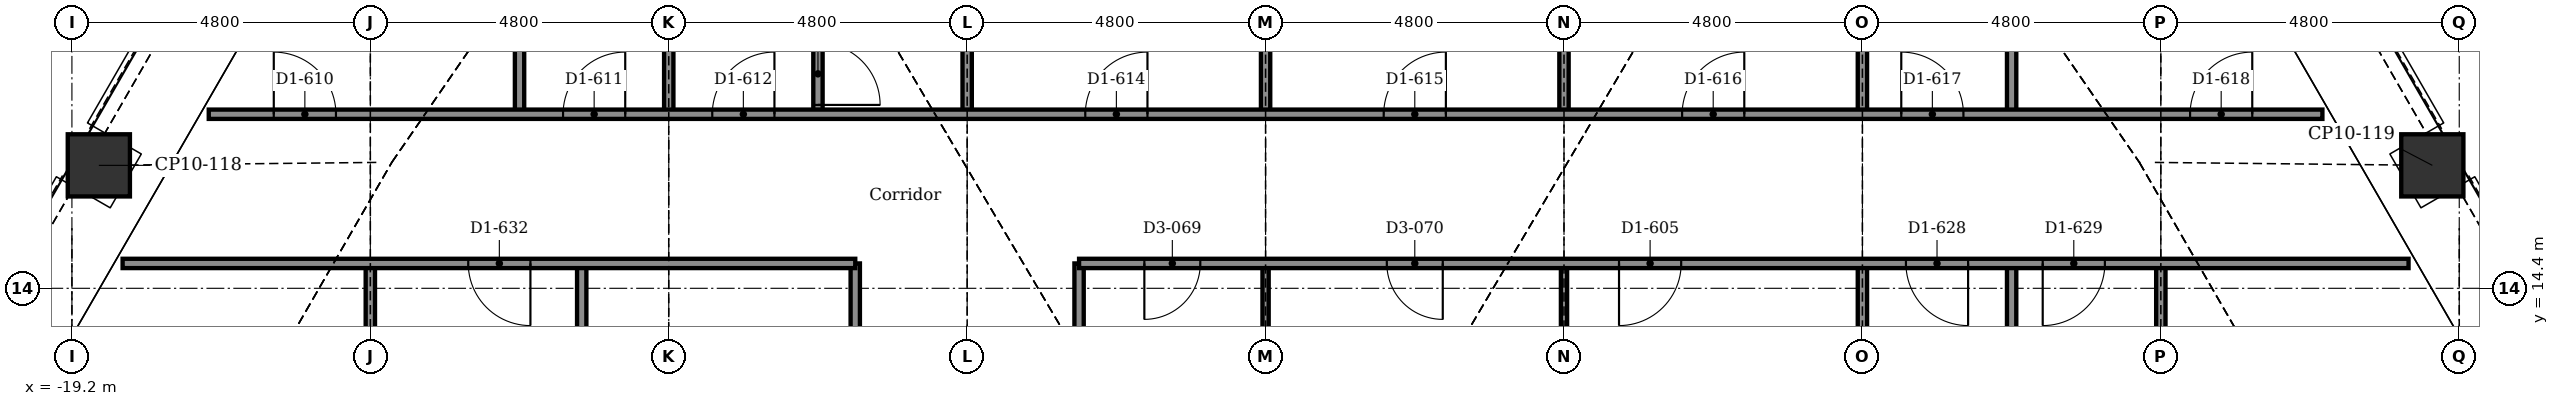
"""IFC4 building model, lengths in metres.
Left out: names, types, materials, properties, quantities, classifications, styles, units other than length and angle.
Written with IfcOpenShell. Run it as: python <this file> out.ifc"""

import sys

from ifc_helpers import new_model, si_unit, direction, frame, frame_2d, origin, origin_2d, place, context, subcontext, project, spatial, rectangle, extrude, element, fill, save


model = new_model("IFC4")
c1 = context("Model", 3, precision=1e-05, world=origin(), true_north=direction((0.0, 1.0)))
c2 = subcontext(c1, "Body", "Model", "MODEL_VIEW")
j1 = project(units=[si_unit("LENGTHUNIT", "METRE"), si_unit("PLANEANGLEUNIT", "RADIAN")], contexts=[c1])
p1 = place(None, origin())
s1 = spatial("IfcSite", under=j1, at=p1, CompositionType="ELEMENT")
p2 = place(p1, origin())
s2 = spatial("IfcBuilding", under=s1, at=p2, CompositionType="ELEMENT")
p3 = place(p2, frame((0.0, 0.0, 216.8)))
s3 = spatial("IfcBuildingStorey", under=s2, at=p3, CompositionType="ELEMENT", Elevation=216.8)
for number, where, z_axis, x_axis in (
    (1, (18.767, 16.378, -0.3), (0.0, 0.0, 1.0), (0.866, 0.5, 0.0)),
    (2, (-18.767, 16.378, -0.3), (0.0, 0.0, 1.0), (0.5, 0.866, 0.0)),
):
    element("IfcColumn", number, at=place(p3, frame(where, z_axis=z_axis, x_axis=x_axis)), inside=s3, PredefinedType="COLUMN", context=c2, shape_type="SweptSolid", body=[
        extrude(rectangle(XDim=1.0, YDim=1.0, at=origin_2d()), origin(), (0.0, 0.0, 1.0), 6.15),
    ])
p4 = place(p3, frame((14.4, 9.674, 0.0), z_axis=(0.0, 0.0, 1.0), x_axis=(0.0, 1.0, 0.0)))
e3 = element("IfcWall", 3, at=p4, inside=s3, PredefinedType="PARTITIONING", context=c2, shape_type="SweptSolid", body=[
    extrude(rectangle(XDim=5.126, YDim=0.15, at=frame_2d((2.563, 0.0))), origin(), (0.0, 0.0, 1.0), 5.54),
])
p5 = place(p3, frame((12.0, -14.8, 0.0), z_axis=(0.0, 0.0, 1.0), x_axis=(0.0, 1.0, 0.0)))
e4 = element("IfcWall", 4, at=p5, inside=s3, PredefinedType="PARTITIONING", context=c2, shape_type="SweptSolid", body=[
    extrude(rectangle(XDim=29.6, YDim=0.15, at=frame_2d((14.8, 0.0))), origin(), (0.0, 0.0, 1.0), 5.85),
])
p6 = place(p3, frame((12.0, 17.2, 0.0), z_axis=(0.0, 0.0, 1.0), x_axis=(0.0, 1.0, 0.0)))
e5 = element("IfcWall", 5, at=p6, inside=s3, PredefinedType="PARTITIONING", context=c2, shape_type="SweptSolid", body=[
    extrude(rectangle(XDim=6.072, YDim=0.15, at=frame_2d((3.036, 0.0))), origin(), (0.0, 0.0, 1.0), 5.7),
])
p7 = place(p3, frame((9.6, 9.95, 0.0), z_axis=(0.0, 0.0, 1.0), x_axis=(0.0, 1.0, 0.0)))
e6 = element("IfcWall", 6, at=p7, inside=s3, PredefinedType="PARTITIONING", context=c2, shape_type="SweptSolid", body=[
    extrude(rectangle(XDim=4.85, YDim=0.15, at=frame_2d((2.425, 0.0))), origin(), (0.0, 0.0, 1.0), 5.393),
])
p8 = place(p3, frame((9.6, 17.2, 0.0), z_axis=(0.0, 0.0, 1.0), x_axis=(0.0, 1.0, 0.0)))
e7 = element("IfcWall", 7, at=p8, inside=s3, PredefinedType="PARTITIONING", context=c2, shape_type="SweptSolid", body=[
    extrude(rectangle(XDim=2.782, YDim=0.15, at=frame_2d((1.391, 0.0))), origin(), (0.0, 0.0, 1.0), 5.393),
])
p9 = place(p3, frame((4.8, 9.95, 0.0), z_axis=(0.0, 0.0, 1.0), x_axis=(0.0, 1.0, 0.0)))
e8 = element("IfcWall", 8, at=p9, inside=s3, PredefinedType="PARTITIONING", context=c2, shape_type="SweptSolid", body=[
    extrude(rectangle(XDim=4.85, YDim=0.1, at=frame_2d((2.425, 0.0))), origin(), (0.0, 0.0, 1.0), 5.54),
])
p10 = place(p3, frame((4.8, 17.2, 0.0), z_axis=(0.0, 0.0, 1.0), x_axis=(0.0, 1.0, 0.0)))
e9 = element("IfcWall", 9, at=p10, inside=s3, PredefinedType="PARTITIONING", context=c2, shape_type="SweptSolid", body=[
    extrude(rectangle(XDim=2.975, YDim=0.15, at=frame_2d((1.487, 0.0))), origin(), (0.0, 0.0, 1.0), 5.54),
])
p11 = place(p3, frame((0.0, 9.95, 0.0), z_axis=(0.0, 0.0, 1.0), x_axis=(0.0, 1.0, 0.0)))
e10 = element("IfcWall", 10, at=p11, inside=s3, PredefinedType="PARTITIONING", context=c2, shape_type="SweptSolid", body=[
    extrude(rectangle(XDim=4.85, YDim=0.1, at=frame_2d((2.425, 0.0))), origin(), (0.0, 0.0, 1.0), 5.317),
])
p12 = place(p3, frame((0.0, 17.2, 0.0), z_axis=(0.0, 0.0, 1.0), x_axis=(0.0, 1.0, 0.0)))
e11 = element("IfcWall", 11, at=p12, inside=s3, PredefinedType="PARTITIONING", context=c2, shape_type="SweptSolid", body=[
    extrude(rectangle(XDim=2.975, YDim=0.15, at=frame_2d((1.487, 0.0))), origin(), (0.0, 0.0, 1.0), 5.317),
])
p13 = place(p3, frame((-3.0, 9.95, 0.0), z_axis=(0.0, 0.0, 1.0), x_axis=(0.0, 1.0, 0.0)))
e12 = element("IfcWall", 12, at=p13, inside=s3, PredefinedType="PARTITIONING", context=c2, shape_type="SweptSolid", body=[
    extrude(rectangle(XDim=4.85, YDim=0.15, at=frame_2d((2.425, 0.0))), origin(), (0.0, 0.0, 1.0), 5.85),
])
p14 = place(p3, frame((-4.8, 17.2, 0.0), z_axis=(0.0, 0.0, 1.0), x_axis=(0.0, 1.0, 0.0)))
e13 = element("IfcWall", 13, at=p14, inside=s3, PredefinedType="PARTITIONING", context=c2, shape_type="SweptSolid", body=[
    extrude(rectangle(XDim=2.975, YDim=0.15, at=frame_2d((1.487, 0.0))), origin(), (0.0, 0.0, 1.0), 5.54),
])
p15 = place(p3, frame((-6.6, 10.15, 0.0), z_axis=(0.0, 0.0, 1.0), x_axis=(0.0, 1.0, 0.0)))
e14 = element("IfcWall", 14, at=p15, inside=s3, PredefinedType="PARTITIONING", context=c2, shape_type="SweptSolid", body=[
    extrude(rectangle(XDim=4.65, YDim=0.15, at=frame_2d((2.325, 0.0))), origin(), (0.0, 0.0, 1.0), 5.85),
])
p16 = place(p15, frame((1.8, 0.0, 0.0)))
e15 = element("IfcOpeningElement", 15, at=p16, cuts=e14, PredefinedType="OPENING", context=c2, shape_type="SweptSolid", body=[
    extrude(rectangle(XDim=0.9, YDim=2.1, at=frame_2d((0.45, 1.05))), frame((0.0, 0.085, 0.0), z_axis=(0.0, -1.0, 0.0), x_axis=(1.0, 0.0, 0.0)), (0.0, 0.0, 1.0), 0.17),
])
p17 = place(p3, frame((-7.2, 17.2, 0.0), z_axis=(0.0, 0.0, 1.0), x_axis=(0.0, 1.0, 0.0)))
e16 = element("IfcWall", 16, at=p17, inside=s3, PredefinedType="PARTITIONING", context=c2, shape_type="SweptSolid", body=[
    extrude(rectangle(XDim=6.072, YDim=0.15, at=frame_2d((3.036, 0.0))), origin(), (0.0, 0.0, 1.0), 5.7),
])
p18 = place(p17, frame((0.15, 0.0, 0.0)))
e17 = element("IfcOpeningElement", 17, at=p18, cuts=e16, PredefinedType="OPENING", context=c2, shape_type="SweptSolid", body=[
    extrude(rectangle(XDim=1.0, YDim=2.1, at=frame_2d((0.5, 1.05))), frame((0.0, 0.085, 0.0), z_axis=(0.0, -1.0, 0.0), x_axis=(1.0, 0.0, 0.0)), (0.0, 0.0, 1.0), 0.17),
])
p19 = place(p3, frame((-9.6, 17.2, 0.0), z_axis=(0.0, 0.0, 1.0), x_axis=(0.0, 1.0, 0.0)))
e18 = element("IfcWall", 18, at=p19, inside=s3, PredefinedType="PARTITIONING", context=c2, shape_type="SweptSolid", body=[
    extrude(rectangle(XDim=2.782, YDim=0.15, at=frame_2d((1.391, 0.0))), origin(), (0.0, 0.0, 1.0), 5.393),
])
p20 = place(p3, frame((-11.0, 10.0, 0.0), z_axis=(0.0, 0.0, 1.0), x_axis=(0.0, 1.0, 0.0)))
e19 = element("IfcWall", 19, at=p20, inside=s3, PredefinedType="PARTITIONING", context=c2, shape_type="SweptSolid", body=[
    extrude(rectangle(XDim=4.8, YDim=0.15, at=frame_2d((2.4, 0.0))), origin(), (0.0, 0.0, 1.0), 5.85),
])
p21 = place(p3, frame((-12.0, 17.2, 0.0), z_axis=(0.0, 0.0, 1.0), x_axis=(0.0, 1.0, 0.0)))
e20 = element("IfcWall", 20, at=p21, inside=s3, PredefinedType="PARTITIONING", context=c2, shape_type="SweptSolid", body=[
    extrude(rectangle(XDim=6.072, YDim=0.15, at=frame_2d((3.036, 0.0))), origin(), (0.0, 0.0, 1.0), 5.7),
])
p22 = place(p3, frame((-14.4, 9.674, 0.0), z_axis=(0.0, 0.0, 1.0), x_axis=(0.0, 1.0, 0.0)))
e21 = element("IfcWall", 21, at=p22, inside=s3, PredefinedType="PARTITIONING", context=c2, shape_type="SweptSolid", body=[
    extrude(rectangle(XDim=5.126, YDim=0.15, at=frame_2d((2.563, 0.0))), origin(), (0.0, 0.0, 1.0), 5.54),
])
p23 = place(p3, frame((-18.385, 14.8, 0.0), z_axis=(0.0, 0.0, 1.0), x_axis=(1.0, 0.0, 0.0)))
e22 = element("IfcWall", 22, at=p23, inside=s3, PredefinedType="PARTITIONING", context=c2, shape_type="SweptSolid", body=[
    extrude(rectangle(XDim=11.784, YDim=0.15, at=frame_2d((5.892, 0.0))), origin(), (0.0, 0.0, 1.0), 5.85),
])
p24 = place(p23, frame((5.56, 0.0, 0.0)))
e23 = element("IfcOpeningElement", 23, at=p24, cuts=e22, PredefinedType="OPENING", context=c2, shape_type="SweptSolid", body=[
    extrude(rectangle(XDim=1.0, YDim=2.1, at=frame_2d((0.5, 1.05))), frame((0.0, 0.085, 0.0), z_axis=(0.0, -1.0, 0.0), x_axis=(1.0, 0.0, 0.0)), (0.0, 0.0, 1.0), 0.17),
])
p25 = place(p3, frame((-3.0, 14.8, 0.0), z_axis=(0.0, 0.0, 1.0), x_axis=(1.0, 0.0, 0.0)))
e24 = element("IfcWall", 24, at=p25, inside=s3, PredefinedType="PARTITIONING", context=c2, shape_type="SweptSolid", body=[
    extrude(rectangle(XDim=21.385, YDim=0.15, at=frame_2d((10.692, 0.0))), origin(), (0.0, 0.0, 1.0), 5.85),
])
p26 = place(p25, frame((1.05, 0.0, 0.0)))
e25 = element("IfcOpeningElement", 25, at=p26, cuts=e24, PredefinedType="OPENING", context=c2, shape_type="SweptSolid", body=[
    extrude(rectangle(XDim=0.9, YDim=2.1, at=frame_2d((0.45, 1.05))), frame((0.0, 0.085, 0.0), z_axis=(0.0, -1.0, 0.0), x_axis=(1.0, 0.0, 0.0)), (0.0, 0.0, 1.0), 0.17),
])
p27 = place(p25, frame((4.95, 0.0, 0.0)))
e26 = element("IfcOpeningElement", 26, at=p27, cuts=e24, PredefinedType="OPENING", context=c2, shape_type="SweptSolid", body=[
    extrude(rectangle(XDim=0.9, YDim=2.1, at=frame_2d((0.45, 1.05))), frame((0.0, 0.085, 0.0), z_axis=(0.0, -1.0, 0.0), x_axis=(1.0, 0.0, 0.0)), (0.0, 0.0, 1.0), 0.17),
])
p28 = place(p25, frame((8.685, 0.0, 0.0)))
e27 = element("IfcOpeningElement", 27, at=p28, cuts=e24, PredefinedType="OPENING", context=c2, shape_type="SweptSolid", body=[
    extrude(rectangle(XDim=1.0, YDim=2.1, at=frame_2d((0.5, 1.05))), frame((0.0, 0.085, 0.0), z_axis=(0.0, -1.0, 0.0), x_axis=(1.0, 0.0, 0.0)), (0.0, 0.0, 1.0), 0.17),
])
p29 = place(p25, frame((13.3, 0.0, 0.0)))
e28 = element("IfcOpeningElement", 28, at=p29, cuts=e24, PredefinedType="OPENING", context=c2, shape_type="SweptSolid", body=[
    extrude(rectangle(XDim=1.0, YDim=2.1, at=frame_2d((0.5, 1.05))), frame((0.0, 0.085, 0.0), z_axis=(0.0, -1.0, 0.0), x_axis=(1.0, 0.0, 0.0)), (0.0, 0.0, 1.0), 0.17),
])
p30 = place(p25, frame((15.5, 0.0, 0.0)))
e29 = element("IfcOpeningElement", 29, at=p30, cuts=e24, PredefinedType="OPENING", context=c2, shape_type="SweptSolid", body=[
    extrude(rectangle(XDim=1.0, YDim=2.1, at=frame_2d((0.5, 1.05))), frame((0.0, 0.085, 0.0), z_axis=(0.0, -1.0, 0.0), x_axis=(1.0, 0.0, 0.0)), (0.0, 0.0, 1.0), 0.17),
])
p31 = place(p3, frame((-16.999, 17.2, 0.0), z_axis=(0.0, 0.0, 1.0), x_axis=(1.0, 0.0, 0.0)))
e30 = element("IfcWall", 30, at=p31, inside=s3, PredefinedType="PARTITIONING", context=c2, shape_type="SweptSolid", body=[
    extrude(rectangle(XDim=33.998, YDim=0.15, at=frame_2d((16.999, 0.0))), origin(), (0.0, 0.0, 1.0), 5.85),
])
p32 = place(p31, frame((1.046, 0.0, 0.0)))
e31 = element("IfcOpeningElement", 31, at=p32, cuts=e30, PredefinedType="OPENING", context=c2, shape_type="SweptSolid", body=[
    extrude(rectangle(XDim=1.0, YDim=2.1, at=frame_2d((0.5, 1.05))), frame((0.0, 0.085, 0.0), z_axis=(0.0, -1.0, 0.0), x_axis=(1.0, 0.0, 0.0)), (0.0, 0.0, 1.0), 0.17),
])
p33 = place(p31, frame((5.699, 0.0, 0.0)))
e32 = element("IfcOpeningElement", 32, at=p33, cuts=e30, PredefinedType="OPENING", context=c2, shape_type="SweptSolid", body=[
    extrude(rectangle(XDim=1.0, YDim=2.1, at=frame_2d((0.5, 1.05))), frame((0.0, 0.085, 0.0), z_axis=(0.0, -1.0, 0.0), x_axis=(1.0, 0.0, 0.0)), (0.0, 0.0, 1.0), 0.17),
])
p34 = place(p31, frame((8.099, 0.0, 0.0)))
e33 = element("IfcOpeningElement", 33, at=p34, cuts=e30, PredefinedType="OPENING", context=c2, shape_type="SweptSolid", body=[
    extrude(rectangle(XDim=1.0, YDim=2.1, at=frame_2d((0.5, 1.05))), frame((0.0, 0.085, 0.0), z_axis=(0.0, -1.0, 0.0), x_axis=(1.0, 0.0, 0.0)), (0.0, 0.0, 1.0), 0.17),
])
p35 = place(p31, frame((14.099, 0.0, 0.0)))
e34 = element("IfcOpeningElement", 34, at=p35, cuts=e30, PredefinedType="OPENING", context=c2, shape_type="SweptSolid", body=[
    extrude(rectangle(XDim=1.0, YDim=2.1, at=frame_2d((0.5, 1.05))), frame((0.0, 0.085, 0.0), z_axis=(0.0, -1.0, 0.0), x_axis=(1.0, 0.0, 0.0)), (0.0, 0.0, 1.0), 0.17),
])
p36 = place(p31, frame((18.899, 0.0, 0.0)))
e35 = element("IfcOpeningElement", 35, at=p36, cuts=e30, PredefinedType="OPENING", context=c2, shape_type="SweptSolid", body=[
    extrude(rectangle(XDim=1.0, YDim=2.1, at=frame_2d((0.5, 1.05))), frame((0.0, 0.085, 0.0), z_axis=(0.0, -1.0, 0.0), x_axis=(1.0, 0.0, 0.0)), (0.0, 0.0, 1.0), 0.17),
])
p37 = place(p31, frame((23.699, 0.0, 0.0)))
e36 = element("IfcOpeningElement", 36, at=p37, cuts=e30, PredefinedType="OPENING", context=c2, shape_type="SweptSolid", body=[
    extrude(rectangle(XDim=1.0, YDim=2.1, at=frame_2d((0.5, 1.05))), frame((0.0, 0.085, 0.0), z_axis=(0.0, -1.0, 0.0), x_axis=(1.0, 0.0, 0.0)), (0.0, 0.0, 1.0), 0.17),
])
p38 = place(p31, frame((27.224, 0.0, 0.0)))
e37 = element("IfcOpeningElement", 37, at=p38, cuts=e30, PredefinedType="OPENING", context=c2, shape_type="SweptSolid", body=[
    extrude(rectangle(XDim=1.0, YDim=2.1, at=frame_2d((0.5, 1.05))), frame((0.0, 0.085, 0.0), z_axis=(0.0, -1.0, 0.0), x_axis=(1.0, 0.0, 0.0)), (0.0, 0.0, 1.0), 0.17),
])
p39 = place(p31, frame((31.87, 0.0, 0.0)))
e38 = element("IfcOpeningElement", 38, at=p39, cuts=e30, PredefinedType="OPENING", context=c2, shape_type="SweptSolid", body=[
    extrude(rectangle(XDim=1.0, YDim=2.1, at=frame_2d((0.5, 1.05))), frame((0.0, 0.085, 0.0), z_axis=(0.0, -1.0, 0.0), x_axis=(1.0, 0.0, 0.0)), (0.0, 0.0, 1.0), 0.17),
])
p40 = place(p26, frame((0.9, 0.0, 0.0), z_axis=(0.0, 0.0, 1.0), x_axis=(-1.0, 0.0, 0.0)))
e39 = element("IfcDoor", 39, at=p40, inside=s3, OperationType="SINGLE_SWING_LEFT", PredefinedType="DOOR", context=c2, shape_type="SweptSolid", body=[
    extrude(rectangle(XDim=0.9, YDim=2.1, at=frame_2d((0.45, 1.05))), frame((0.0, 0.025, 0.0), z_axis=(0.0, -1.0, 0.0), x_axis=(1.0, 0.0, 0.0)), (0.0, 0.0, 1.0), 0.05),
])
fill(e25, e39)
p41 = place(p27, frame((0.9, 0.0, 0.0), z_axis=(0.0, 0.0, 1.0), x_axis=(-1.0, 0.0, 0.0)))
e40 = element("IfcDoor", 40, at=p41, inside=s3, OperationType="SINGLE_SWING_RIGHT", PredefinedType="DOOR", context=c2, shape_type="SweptSolid", body=[
    extrude(rectangle(XDim=0.9, YDim=2.1, at=frame_2d((0.45, 1.05))), frame((0.0, 0.025, 0.0), z_axis=(0.0, -1.0, 0.0), x_axis=(1.0, 0.0, 0.0)), (0.0, 0.0, 1.0), 0.05),
])
fill(e26, e40)
p42 = place(p28, frame((1.0, 0.0, 0.0), z_axis=(0.0, 0.0, 1.0), x_axis=(-1.0, 0.0, 0.0)))
e41 = element("IfcDoor", 41, at=p42, inside=s3, OperationType="SINGLE_SWING_LEFT", PredefinedType="DOOR", context=c2, shape_type="SweptSolid", body=[
    extrude(rectangle(XDim=1.0, YDim=2.1, at=frame_2d((0.5, 1.05))), frame((0.0, 0.025, 0.0), z_axis=(0.0, -1.0, 0.0), x_axis=(1.0, 0.0, 0.0)), (0.0, 0.0, 1.0), 0.05),
])
fill(e27, e41)
p43 = place(p32, origin())
e42 = element("IfcDoor", 42, at=p43, inside=s3, OperationType="SINGLE_SWING_LEFT", PredefinedType="DOOR", context=c2, shape_type="SweptSolid", body=[
    extrude(rectangle(XDim=1.0, YDim=2.1, at=frame_2d((0.5, 1.05))), frame((0.0, 0.025, 0.0), z_axis=(0.0, -1.0, 0.0), x_axis=(1.0, 0.0, 0.0)), (0.0, 0.0, 1.0), 0.05),
])
fill(e31, e42)
p44 = place(p33, origin())
e43 = element("IfcDoor", 43, at=p44, inside=s3, OperationType="SINGLE_SWING_RIGHT", PredefinedType="DOOR", context=c2, shape_type="SweptSolid", body=[
    extrude(rectangle(XDim=1.0, YDim=2.1, at=frame_2d((0.5, 1.05))), frame((0.0, 0.025, 0.0), z_axis=(0.0, -1.0, 0.0), x_axis=(1.0, 0.0, 0.0)), (0.0, 0.0, 1.0), 0.05),
])
fill(e32, e43)
p45 = place(p34, origin())
e44 = element("IfcDoor", 44, at=p45, inside=s3, OperationType="SINGLE_SWING_RIGHT", PredefinedType="DOOR", context=c2, shape_type="SweptSolid", body=[
    extrude(rectangle(XDim=1.0, YDim=2.1, at=frame_2d((0.5, 1.05))), frame((0.0, 0.025, 0.0), z_axis=(0.0, -1.0, 0.0), x_axis=(1.0, 0.0, 0.0)), (0.0, 0.0, 1.0), 0.05),
])
fill(e33, e44)
p46 = place(p18, frame((1.0, 0.0, 0.0), z_axis=(0.0, 0.0, 1.0), x_axis=(-1.0, 0.0, 0.0)))
e45 = element("IfcDoor", 45, at=p46, inside=s3, OperationType="SINGLE_SWING_LEFT", PredefinedType="DOOR", context=c2, shape_type="SweptSolid", body=[
    extrude(rectangle(XDim=1.0, YDim=2.1, at=frame_2d((0.5, 1.05))), frame((0.0, 0.025, 0.0), z_axis=(0.0, -1.0, 0.0), x_axis=(1.0, 0.0, 0.0)), (0.0, 0.0, 1.0), 0.05),
])
fill(e17, e45)
p47 = place(p35, origin())
e46 = element("IfcDoor", 46, at=p47, inside=s3, OperationType="SINGLE_SWING_RIGHT", PredefinedType="DOOR", context=c2, shape_type="SweptSolid", body=[
    extrude(rectangle(XDim=1.0, YDim=2.1, at=frame_2d((0.5, 1.05))), frame((0.0, 0.025, 0.0), z_axis=(0.0, -1.0, 0.0), x_axis=(1.0, 0.0, 0.0)), (0.0, 0.0, 1.0), 0.05),
])
fill(e34, e46)
p48 = place(p36, origin())
e47 = element("IfcDoor", 47, at=p48, inside=s3, OperationType="SINGLE_SWING_RIGHT", PredefinedType="DOOR", context=c2, shape_type="SweptSolid", body=[
    extrude(rectangle(XDim=1.0, YDim=2.1, at=frame_2d((0.5, 1.05))), frame((0.0, 0.025, 0.0), z_axis=(0.0, -1.0, 0.0), x_axis=(1.0, 0.0, 0.0)), (0.0, 0.0, 1.0), 0.05),
])
fill(e35, e47)
p49 = place(p37, origin())
e48 = element("IfcDoor", 48, at=p49, inside=s3, OperationType="SINGLE_SWING_RIGHT", PredefinedType="DOOR", context=c2, shape_type="SweptSolid", body=[
    extrude(rectangle(XDim=1.0, YDim=2.1, at=frame_2d((0.5, 1.05))), frame((0.0, 0.025, 0.0), z_axis=(0.0, -1.0, 0.0), x_axis=(1.0, 0.0, 0.0)), (0.0, 0.0, 1.0), 0.05),
])
fill(e36, e48)
p50 = place(p38, origin())
e49 = element("IfcDoor", 49, at=p50, inside=s3, OperationType="SINGLE_SWING_LEFT", PredefinedType="DOOR", context=c2, shape_type="SweptSolid", body=[
    extrude(rectangle(XDim=1.0, YDim=2.1, at=frame_2d((0.5, 1.05))), frame((0.0, 0.025, 0.0), z_axis=(0.0, -1.0, 0.0), x_axis=(1.0, 0.0, 0.0)), (0.0, 0.0, 1.0), 0.05),
])
fill(e37, e49)
p51 = place(p39, origin())
e50 = element("IfcDoor", 50, at=p51, inside=s3, OperationType="SINGLE_SWING_RIGHT", PredefinedType="DOOR", context=c2, shape_type="SweptSolid", body=[
    extrude(rectangle(XDim=1.0, YDim=2.1, at=frame_2d((0.5, 1.05))), frame((0.0, 0.025, 0.0), z_axis=(0.0, -1.0, 0.0), x_axis=(1.0, 0.0, 0.0)), (0.0, 0.0, 1.0), 0.05),
])
fill(e38, e50)
p52 = place(p29, frame((1.0, 0.0, 0.0), z_axis=(0.0, 0.0, 1.0), x_axis=(-1.0, 0.0, 0.0)))
e51 = element("IfcDoor", 51, at=p52, inside=s3, OperationType="SINGLE_SWING_RIGHT", PredefinedType="DOOR", context=c2, shape_type="SweptSolid", body=[
    extrude(rectangle(XDim=1.0, YDim=2.1, at=frame_2d((0.5, 1.05))), frame((0.0, 0.025, 0.0), z_axis=(0.0, -1.0, 0.0), x_axis=(1.0, 0.0, 0.0)), (0.0, 0.0, 1.0), 0.05),
])
fill(e28, e51)
p53 = place(p30, frame((1.0, 0.0, 0.0), z_axis=(0.0, 0.0, 1.0), x_axis=(-1.0, 0.0, 0.0)))
e52 = element("IfcDoor", 52, at=p53, inside=s3, OperationType="SINGLE_SWING_LEFT", PredefinedType="DOOR", context=c2, shape_type="SweptSolid", body=[
    extrude(rectangle(XDim=1.0, YDim=2.1, at=frame_2d((0.5, 1.05))), frame((0.0, 0.025, 0.0), z_axis=(0.0, -1.0, 0.0), x_axis=(1.0, 0.0, 0.0)), (0.0, 0.0, 1.0), 0.05),
])
fill(e29, e52)
p54 = place(p24, frame((1.0, 0.0, 0.0), z_axis=(0.0, 0.0, 1.0), x_axis=(-1.0, 0.0, 0.0)))
e53 = element("IfcDoor", 53, at=p54, inside=s3, OperationType="SINGLE_SWING_RIGHT", PredefinedType="DOOR", context=c2, shape_type="SweptSolid", body=[
    extrude(rectangle(XDim=1.0, YDim=2.1, at=frame_2d((0.5, 1.05))), frame((0.0, 0.025, 0.0), z_axis=(0.0, -1.0, 0.0), x_axis=(1.0, 0.0, 0.0)), (0.0, 0.0, 1.0), 0.05),
])
fill(e23, e53)
save(model, sys.argv[1])
